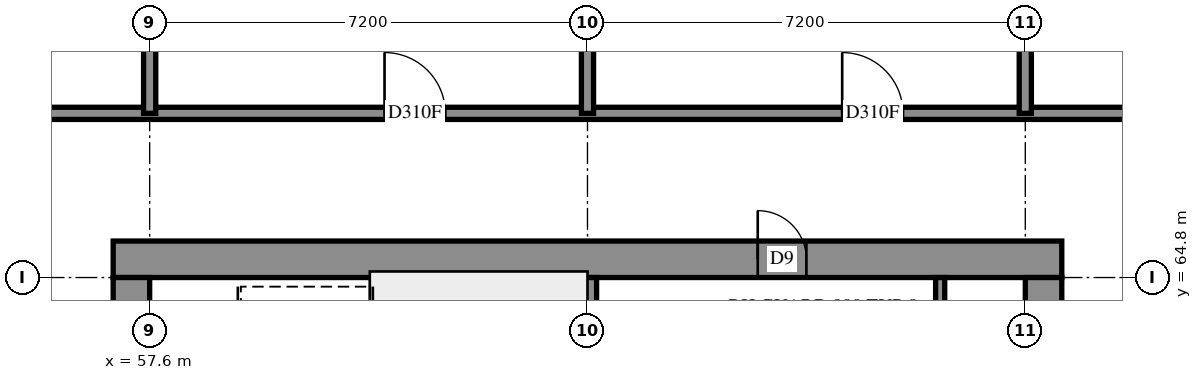
"""IFC4 building model, lengths in metres.
Left out: names, types, materials, properties, quantities, classifications, styles, units other than length and angle.
Written with IfcOpenShell. Run it as: python <this file> out.ifc"""

import sys

from ifc_helpers import new_model, si_unit, direction, frame, frame_2d, origin, place, context, subcontext, project, spatial, rectangle, extrude, element, fill, save


model = new_model("IFC4")
c1 = context("Model", 3, precision=1e-05, world=origin(), true_north=direction((0.0, 1.0)))
c2 = subcontext(c1, "Body", "Model", "MODEL_VIEW")
j1 = project(units=[si_unit("LENGTHUNIT", "METRE"), si_unit("PLANEANGLEUNIT", "RADIAN")], contexts=[c1])
p1 = place(None, origin())
s1 = spatial("IfcSite", under=j1, at=p1, CompositionType="ELEMENT")
p2 = place(p1, origin())
s2 = spatial("IfcBuilding", under=s1, at=p2, CompositionType="ELEMENT")
p3 = place(p2, frame((0.0, 0.0, 135.4)))
s3 = spatial("IfcBuildingStorey", under=s2, at=p3, CompositionType="ELEMENT", Elevation=135.4)
p4 = place(p3, frame((57.0, 65.1, -0.3), z_axis=(0.0, 0.0, 1.0), x_axis=(1.0, 0.0, 0.0)))
e1 = element("IfcWall", 1, at=p4, inside=s3, PredefinedType="SHEAR", context=c2, shape_type="SweptSolid", body=[
    extrude(rectangle(XDim=15.6, YDim=0.6, at=frame_2d((7.8, 0.0))), origin(), (0.0, 0.0, 1.0), 2.7),
])
p5 = place(p4, frame((10.6, 0.0, 0.3)))
e2 = element("IfcOpeningElement", 2, at=p5, cuts=e1, PredefinedType="OPENING", context=c2, shape_type="SweptSolid", body=[
    extrude(rectangle(XDim=0.8, YDim=2.1, at=frame_2d((0.4, 1.05))), frame((0.0, 0.31, 0.0), z_axis=(0.0, -1.0, 0.0), x_axis=(1.0, 0.0, 0.0)), (0.0, 0.0, 1.0), 0.62),
])
p6 = place(p3, frame((57.3, 50.4, -0.3), z_axis=(0.0, 0.0, 1.0), x_axis=(0.0, 1.0, 0.0)))
e3 = element("IfcWall", 3, at=p6, inside=s3, PredefinedType="SHEAR", context=c2, shape_type="SweptSolid", body=[
    extrude(rectangle(XDim=14.4, YDim=0.6, at=frame_2d((7.2, 0.0))), origin(), (0.0, 0.0, 1.0), 2.7),
])
p7 = place(p6, frame((4.55, 0.0, 0.3)))
e4 = element("IfcOpeningElement", 4, at=p7, cuts=e3, PredefinedType="OPENING", context=c2, shape_type="SweptSolid", body=[
    extrude(rectangle(XDim=1.1, YDim=2.1, at=frame_2d((0.55, 1.05))), frame((0.0, 0.31, 0.0), z_axis=(0.0, -1.0, 0.0), x_axis=(1.0, 0.0, 0.0)), (0.0, 0.0, 1.0), 0.62),
])
p8 = place(p6, frame((11.35, 0.0, 0.3)))
e5 = element("IfcOpeningElement", 5, at=p8, cuts=e3, PredefinedType="OPENING", context=c2, shape_type="SweptSolid", body=[
    extrude(rectangle(XDim=1.1, YDim=2.1, at=frame_2d((0.55, 1.05))), frame((0.0, 0.31, 0.0), z_axis=(0.0, -1.0, 0.0), x_axis=(1.0, 0.0, 0.0)), (0.0, 0.0, 1.0), 0.62),
])
p9 = place(p3, frame((72.3, 50.4, -0.3), z_axis=(0.0, 0.0, 1.0), x_axis=(0.0, 1.0, 0.0)))
e6 = element("IfcWall", 6, at=p9, inside=s3, PredefinedType="SHEAR", context=c2, shape_type="SweptSolid", body=[
    extrude(rectangle(XDim=14.4, YDim=0.6, at=frame_2d((7.2, 0.0))), origin(), (0.0, 0.0, 1.0), 2.7),
])
p10 = place(p9, frame((4.55, 0.0, 0.3)))
e7 = element("IfcOpeningElement", 7, at=p10, cuts=e6, PredefinedType="OPENING", context=c2, shape_type="SweptSolid", body=[
    extrude(rectangle(XDim=1.1, YDim=2.1, at=frame_2d((0.55, 1.05))), frame((0.0, 0.31, 0.0), z_axis=(0.0, -1.0, 0.0), x_axis=(1.0, 0.0, 0.0)), (0.0, 0.0, 1.0), 0.62),
])
p11 = place(p9, frame((11.35, 0.0, 0.3)))
e8 = element("IfcOpeningElement", 8, at=p11, cuts=e6, PredefinedType="OPENING", context=c2, shape_type="SweptSolid", body=[
    extrude(rectangle(XDim=1.1, YDim=2.1, at=frame_2d((0.55, 1.05))), frame((0.0, 0.31, 0.0), z_axis=(0.0, -1.0, 0.0), x_axis=(1.0, 0.0, 0.0)), (0.0, 0.0, 1.0), 0.62),
])
p12 = place(p3, frame((64.8, 60.6, 0.0), z_axis=(0.0, 0.0, 1.0), x_axis=(0.0, 1.0, 0.0)))
e9 = element("IfcWall", 9, at=p12, inside=s3, PredefinedType="SOLIDWALL", context=c2, shape_type="SweptSolid", body=[
    extrude(rectangle(XDim=4.2, YDim=0.3, at=frame_2d((2.1, 0.0))), origin(), (0.0, 0.0, 1.0), 3.1),
])
p13 = place(p3, frame((70.6, 63.78, 0.0), z_axis=(0.0, 0.0, 1.0), x_axis=(0.0, 1.0, 0.0)))
e10 = element("IfcWall", 10, at=p13, inside=s3, PredefinedType="PARTITIONING", context=c2, shape_type="SweptSolid", body=[
    extrude(rectangle(XDim=1.02, YDim=0.15, at=frame_2d((0.51, 0.0))), origin(), (0.0, 0.0, 1.0), 3.1),
])
p14 = place(p3, frame((54.9, 67.5, 0.0), z_axis=(0.0, 0.0, 1.0), x_axis=(1.0, 0.0, 0.0)))
e11 = element("IfcWall", 11, at=p14, inside=s3, PredefinedType="PARTITIONING", context=c2, shape_type="SweptSolid", body=[
    extrude(rectangle(XDim=19.8, YDim=0.2, at=frame_2d((9.9, 0.0))), origin(), (0.0, 0.0, 1.0), 3.1),
])
p15 = place(p14, frame((6.562, 0.0, 0.0)))
e12 = element("IfcOpeningElement", 12, at=p15, cuts=e11, PredefinedType="OPENING", context=c2, shape_type="SweptSolid", body=[
    extrude(rectangle(XDim=1.0, YDim=2.1, at=frame_2d((0.5, 1.05))), frame((0.0, 0.11, 0.0), z_axis=(0.0, -1.0, 0.0), x_axis=(1.0, 0.0, 0.0)), (0.0, 0.0, 1.0), 0.22),
])
p16 = place(p14, frame((14.089, 0.0, 0.0)))
e13 = element("IfcOpeningElement", 13, at=p16, cuts=e11, PredefinedType="OPENING", context=c2, shape_type="SweptSolid", body=[
    extrude(rectangle(XDim=1.0, YDim=2.1, at=frame_2d((0.5, 1.05))), frame((0.0, 0.11, 0.0), z_axis=(0.0, -1.0, 0.0), x_axis=(1.0, 0.0, 0.0)), (0.0, 0.0, 1.0), 0.22),
])
for number, where, z_axis, x_axis in (
    (14, (57.6, 67.5, 0.0), (0.0, 0.0, 1.0), (0.0, 1.0, 0.0)),
    (15, (64.8, 67.5, 0.0), (0.0, 0.0, 1.0), (0.0, 1.0, 0.0)),
):
    element("IfcWall", number, at=place(p3, frame(where, z_axis=z_axis, x_axis=x_axis)), inside=s3, PredefinedType="PARTITIONING", context=c2, shape_type="SweptSolid", body=[
        extrude(rectangle(XDim=4.05, YDim=0.2, at=frame_2d((2.025, 0.0))), origin(), (0.0, 0.0, 1.0), 3.1),
    ])
p17 = place(p3, frame((72.0, 67.5, 0.0), z_axis=(0.0, 0.0, 1.0), x_axis=(0.0, 1.0, 0.0)))
e16 = element("IfcWall", 16, at=p17, inside=s3, PredefinedType="PARTITIONING", context=c2, shape_type="SweptSolid", body=[
    extrude(rectangle(XDim=3.946, YDim=0.2, at=frame_2d((1.973, 0.0))), origin(), (0.0, 0.0, 1.0), 3.1),
])
p18 = place(p5, origin())
e17 = element("IfcDoor", 17, at=p18, inside=s3, OperationType="SINGLE_SWING_RIGHT", PredefinedType="DOOR", context=c2, shape_type="SweptSolid", body=[
    extrude(rectangle(XDim=0.8, YDim=2.1, at=frame_2d((0.4, 1.05))), frame((0.0, 0.025, 0.0), z_axis=(0.0, -1.0, 0.0), x_axis=(1.0, 0.0, 0.0)), (0.0, 0.0, 1.0), 0.05),
])
fill(e2, e17)
p19 = place(p15, origin())
e18 = element("IfcDoor", 18, at=p19, inside=s3, OperationType="SINGLE_SWING_RIGHT", PredefinedType="DOOR", context=c2, shape_type="SweptSolid", body=[
    extrude(rectangle(XDim=1.0, YDim=2.1, at=frame_2d((0.5, 1.05))), frame((0.0, 0.025, 0.0), z_axis=(0.0, -1.0, 0.0), x_axis=(1.0, 0.0, 0.0)), (0.0, 0.0, 1.0), 0.05),
])
fill(e12, e18)
p20 = place(p16, origin())
e19 = element("IfcDoor", 19, at=p20, inside=s3, OperationType="SINGLE_SWING_RIGHT", PredefinedType="DOOR", context=c2, shape_type="SweptSolid", body=[
    extrude(rectangle(XDim=1.0, YDim=2.1, at=frame_2d((0.5, 1.05))), frame((0.0, 0.025, 0.0), z_axis=(0.0, -1.0, 0.0), x_axis=(1.0, 0.0, 0.0)), (0.0, 0.0, 1.0), 0.05),
])
fill(e13, e19)
save(model, sys.argv[1])
